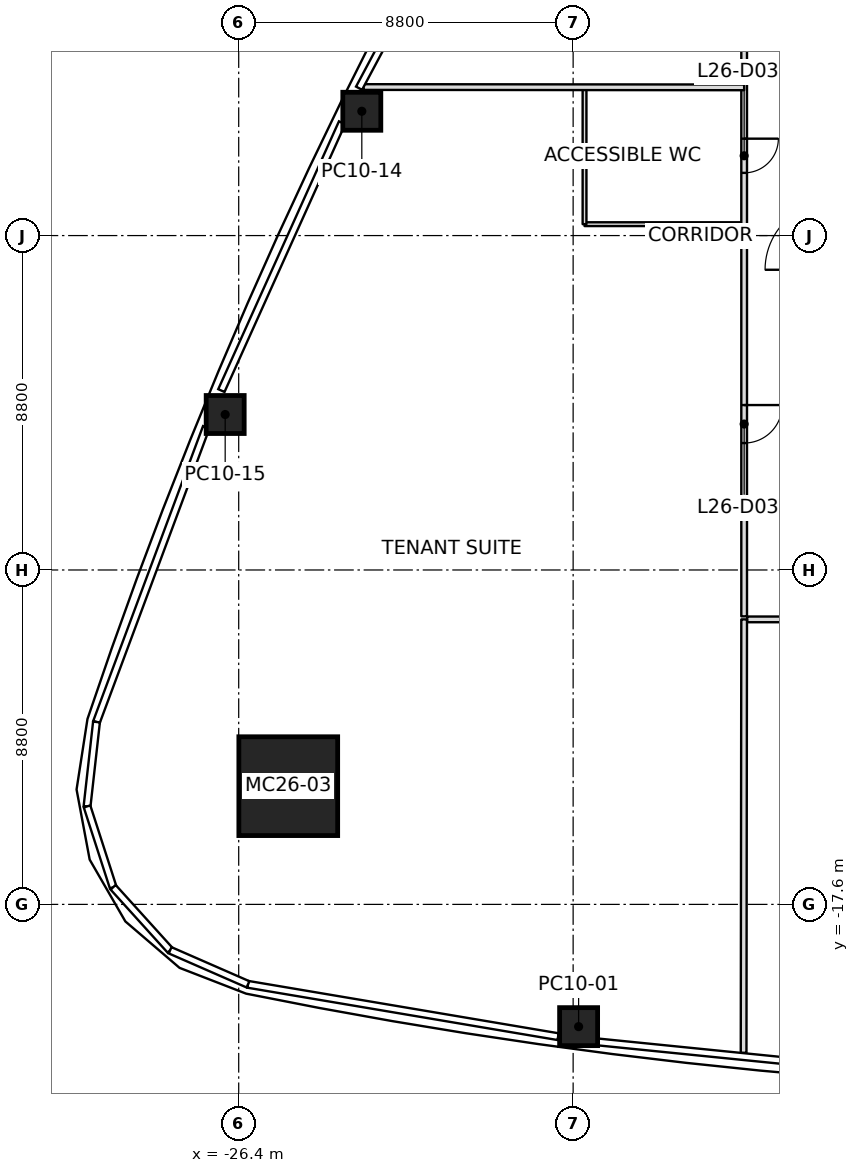
"""IFC4 building model, lengths in metres.
Left out: names, types, materials, properties, quantities, classifications, styles, units other than length and angle.
Written with IfcOpenShell. Run it as: python <this file> out.ifc"""

import sys

from ifc_helpers import new_model, si_unit, direction, frame, frame_2d, origin, origin_2d, place, context, subcontext, project, spatial, rectangle, extrude, clip, halfspace, element, fill, save


model = new_model("IFC4")
c1 = context("Model", 3, precision=1e-05, world=origin(), true_north=direction((0.0, 1.0)))
c2 = subcontext(c1, "Body", "Model", "MODEL_VIEW")
j1 = project(units=[si_unit("LENGTHUNIT", "METRE"), si_unit("PLANEANGLEUNIT", "RADIAN")], contexts=[c1])
p1 = place(None, origin())
s1 = spatial("IfcSite", under=j1, at=p1, CompositionType="ELEMENT")
p2 = place(p1, origin())
s2 = spatial("IfcBuilding", under=s1, at=p2, CompositionType="ELEMENT")
p3 = place(p2, frame((0.0, 0.0, 125.8)))
s3 = spatial("IfcBuildingStorey", under=s2, at=p3, CompositionType="ELEMENT", Elevation=125.8)
p4 = place(p3, frame((-25.096, -14.489, 0.0), z_axis=(0.028122372328, 0.016226791842, 0.999472772716), x_axis=(0.999604487872, -0.00045651644, -0.02811866672)))
e1 = element("IfcColumn", 1, at=p4, inside=s3, PredefinedType="COLUMN", context=c2, shape_type="SweptSolid", body=[
    clip(extrude(rectangle(XDim=2.6, YDim=2.6, at=origin_2d()), origin(), (0.0, 0.0, 1.0), 4.002), halfspace(frame((0.0, 0.0, 0.013)), True)),
])
p5 = place(p3, frame((-17.456, -20.817, 0.0), z_axis=(0.017696448434, 0.010495824588, 0.999788314284), x_axis=(-0.990918277047, 0.133493566713, 0.016138025322)))
e2 = element("IfcColumn", 2, at=p5, inside=s3, PredefinedType="COLUMN", context=c2, shape_type="SweptSolid", body=[
    clip(extrude(rectangle(XDim=1.0, YDim=1.0, at=origin_2d()), origin(), (0.0, 0.0, 1.0), 4.001), halfspace(frame((0.0, 0.0, 0.003)), True)),
])
p6 = place(p3, frame((-23.161, 3.271, 0.0), z_axis=(0.014158706356, 0.002074982828, 0.999897607498), x_axis=(0.440982382109, 0.897479146317, -0.008106823952)))
e3 = element("IfcColumn", 3, at=p6, inside=s3, PredefinedType="COLUMN", context=c2, shape_type="SweptSolid", body=[
    clip(extrude(rectangle(XDim=1.0, YDim=1.0, at=origin_2d()), origin(), (0.0, 0.0, 1.0), 4.0), halfspace(frame((0.0, 0.0, 0.002)), True)),
])
p7 = place(p3, frame((-26.756, -4.709, 0.0), z_axis=(0.01794052709, 0.010129685364, 0.999787740954), x_axis=(0.38001982698, 0.924836651145, -0.016189496657)))
e4 = element("IfcColumn", 4, at=p7, inside=s3, PredefinedType="COLUMN", context=c2, shape_type="SweptSolid", body=[
    clip(extrude(rectangle(XDim=1.0, YDim=1.0, at=origin_2d()), origin(), (0.0, 0.0, 1.0), 4.001), halfspace(frame((0.0, 0.0, 0.003)), True)),
])
p8 = place(p3, frame((-13.1, 3.9, 0.0), z_axis=(0.0, 0.0, 1.0), x_axis=(-0.99999961506, 0.000877427823, 0.0)))
e5 = element("IfcWall", 5, at=p8, inside=s3, PredefinedType="PARTITIONING", context=c2, shape_type="SweptSolid", body=[
    extrude(rectangle(XDim=10.017, YDim=0.15, at=frame_2d((5.008, 0.0))), origin(), (0.0, 0.0, 1.0), 3.234),
])
p9 = place(p3, frame((-13.1, -10.1, 0.0), z_axis=(0.0, 0.0, 1.0), x_axis=(-0.001241543696, -0.999999229284, 0.0)))
e6 = element("IfcWall", 6, at=p9, inside=s3, PredefinedType="PARTITIONING", context=c2, shape_type="SweptSolid", body=[
    extrude(rectangle(XDim=11.405, YDim=0.15, at=frame_2d((5.703, 0.0))), origin(), (0.0, 0.0, 1.0), 3.234),
])
p10 = place(p3, frame((-13.1, 10.02, 0.0), z_axis=(0.0, 0.0, 1.0), x_axis=(0.0, -1.0, 0.0)))
e7 = element("IfcWall", 7, at=p10, inside=s3, PredefinedType="PARTITIONING", context=c2, shape_type="SweptSolid", body=[
    extrude(rectangle(XDim=20.04, YDim=0.15, at=frame_2d((10.02, 0.0))), origin(), (0.0, 0.0, 1.0), 3.166),
])
p11 = place(p10, frame((2.52, 0.0, 0.0)))
e8 = element("IfcOpeningElement", 8, at=p11, cuts=e7, PredefinedType="OPENING", context=c2, shape_type="SweptSolid", body=[
    extrude(rectangle(XDim=1.0, YDim=2.1, at=frame_2d((0.5, 1.05))), frame((0.0, 0.075, 0.0), z_axis=(0.0, -1.0, 0.0), x_axis=(1.0, 0.0, 0.0)), (0.0, 0.0, 1.0), 0.15),
])
p12 = place(p10, frame((7.47, 0.0, 0.0)))
e9 = element("IfcOpeningElement", 9, at=p12, cuts=e7, PredefinedType="OPENING", context=c2, shape_type="SweptSolid", body=[
    extrude(rectangle(XDim=0.9, YDim=2.1, at=frame_2d((0.45, 1.05))), frame((0.0, 0.075, 0.0), z_axis=(0.0, -1.0, 0.0), x_axis=(1.0, 0.0, 0.0)), (0.0, 0.0, 1.0), 0.15),
])
p13 = place(p10, frame((14.48, 0.0, 0.0)))
e10 = element("IfcOpeningElement", 10, at=p13, cuts=e7, PredefinedType="OPENING", context=c2, shape_type="SweptSolid", body=[
    extrude(rectangle(XDim=1.0, YDim=2.1, at=frame_2d((0.5, 1.05))), frame((0.0, 0.075, 0.0), z_axis=(0.0, -1.0, 0.0), x_axis=(1.0, 0.0, 0.0)), (0.0, 0.0, 1.0), 0.15),
])
p14 = place(p3, frame((-13.02, -10.1, 0.0), z_axis=(0.0, 0.0, 1.0), x_axis=(1.0, 0.0, 0.0)))
e11 = element("IfcWall", 11, at=p14, inside=s3, PredefinedType="PARTITIONING", context=c2, shape_type="SweptSolid", body=[
    extrude(rectangle(XDim=26.12, YDim=0.15, at=frame_2d((13.06, 0.0))), origin(), (0.0, 0.0, 1.0), 3.317),
])
p15 = place(p14, frame((5.52, 0.0, 0.0)))
e12 = element("IfcOpeningElement", 12, at=p15, cuts=e11, PredefinedType="OPENING", context=c2, shape_type="SweptSolid", body=[
    extrude(rectangle(XDim=1.0, YDim=2.1, at=frame_2d((0.5, 1.05))), frame((0.0, 0.075, 0.0), z_axis=(0.0, -1.0, 0.0), x_axis=(1.0, 0.0, 0.0)), (0.0, 0.0, 1.0), 0.15),
])
p16 = place(p14, frame((18.62, 0.0, 0.0)))
e13 = element("IfcOpeningElement", 13, at=p16, cuts=e11, PredefinedType="OPENING", context=c2, shape_type="SweptSolid", body=[
    extrude(rectangle(XDim=1.0, YDim=2.1, at=frame_2d((0.5, 1.05))), frame((0.0, 0.075, 0.0), z_axis=(0.0, -1.0, 0.0), x_axis=(1.0, 0.0, 0.0)), (0.0, 0.0, 1.0), 0.15),
])
p17 = place(p3, frame((-13.13, 0.3, 0.0), z_axis=(0.0, 0.0, 1.0), x_axis=(-1.0, 0.0, 0.0)))
e14 = element("IfcWall", 14, at=p17, inside=s3, PredefinedType="PARTITIONING", context=c2, shape_type="SweptSolid", body=[
    extrude(rectangle(XDim=4.17, YDim=0.1, at=frame_2d((2.085, 0.0))), origin(), (0.0, 0.0, 1.0), 3.45),
])
p18 = place(p3, frame((-17.3, 0.3, 0.0), z_axis=(0.0, 0.0, 1.0), x_axis=(0.0, 1.0, 0.0)))
e15 = element("IfcWall", 15, at=p18, inside=s3, PredefinedType="PARTITIONING", context=c2, shape_type="SweptSolid", body=[
    extrude(rectangle(XDim=3.57, YDim=0.1, at=frame_2d((1.785, 0.0))), origin(), (0.0, 0.0, 1.0), 3.45),
])
p19 = place(p12, origin())
e16 = element("IfcDoor", 16, at=p19, inside=s3, OperationType="SINGLE_SWING_LEFT", PredefinedType="DOOR", context=c2, shape_type="SweptSolid", body=[
    extrude(rectangle(XDim=0.9, YDim=2.1, at=frame_2d((0.45, 1.05))), frame((0.0, 0.025, 0.0), z_axis=(0.0, -1.0, 0.0), x_axis=(1.0, 0.0, 0.0)), (0.0, 0.0, 1.0), 0.05),
])
fill(e9, e16)
p20 = place(p13, origin())
e17 = element("IfcDoor", 17, at=p20, inside=s3, OperationType="SINGLE_SWING_RIGHT", PredefinedType="DOOR", context=c2, shape_type="SweptSolid", body=[
    extrude(rectangle(XDim=1.0, YDim=2.1, at=frame_2d((0.5, 1.05))), frame((0.0, 0.025, 0.0), z_axis=(0.0, -1.0, 0.0), x_axis=(1.0, 0.0, 0.0)), (0.0, 0.0, 1.0), 0.05),
])
fill(e10, e17)
save(model, sys.argv[1])
